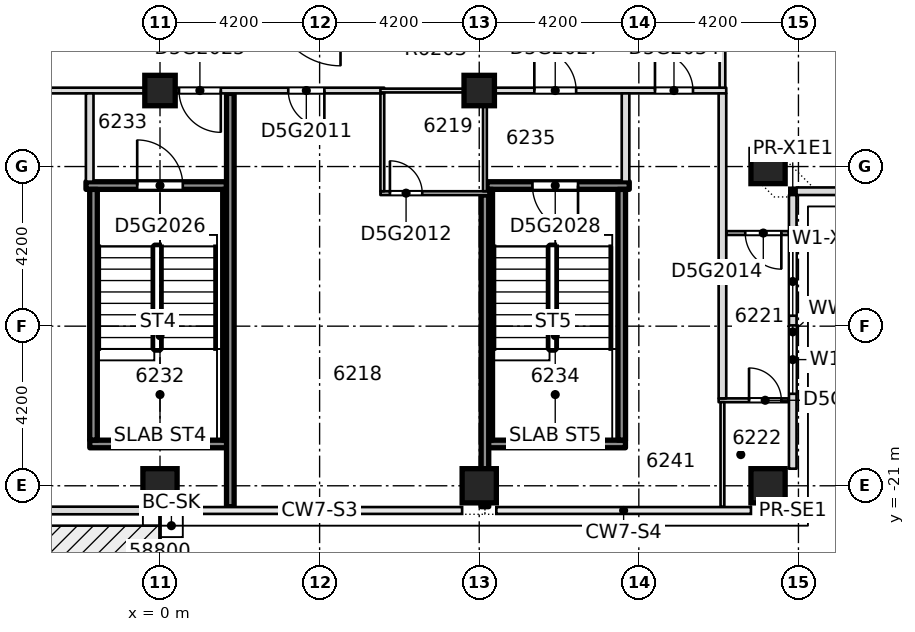
"""IFC4 building model, lengths in metres.
Left out: names, types, materials, properties, quantities, classifications, styles, units other than length and angle.
Written with IfcOpenShell. Run it as: python <this file> out.ifc"""

import sys

from ifc_helpers import new_model, si_unit, direction, frame, frame_2d, origin, origin_2d, place, context, subcontext, project, spatial, rectangle, extrude, element, fill, save


model = new_model("IFC4")
c1 = context("Model", 3, precision=1e-05, world=origin(), true_north=direction((0.0, 1.0)))
c2 = subcontext(c1, "Body", "Model", "MODEL_VIEW")
j1 = project(units=[si_unit("LENGTHUNIT", "METRE"), si_unit("PLANEANGLEUNIT", "RADIAN")], contexts=[c1])
p1 = place(None, origin())
s1 = spatial("IfcSite", under=j1, at=p1, CompositionType="ELEMENT")
p2 = place(p1, origin())
s2 = spatial("IfcBuilding", under=s1, at=p2, CompositionType="ELEMENT")
p3 = place(p2, frame((0.0, 0.0, 237.25)))
s3 = spatial("IfcBuildingStorey", under=s2, at=p3, CompositionType="ELEMENT", Elevation=237.25)
for number, where, z_axis, x_axis in (
    (1, (0.0, -21.0, -0.4), (0.0, 0.0, 1.0), (1.0, 0.0, 0.0)),
    (2, (8.4, -21.0, -0.4), (0.0, 0.0, 1.0), (1.0, 0.0, 0.0)),
    (3, (16.0, -21.0, -0.4), (0.0, 0.0, 1.0), (1.0, 0.0, 0.0)),
    (4, (16.0, -12.6, -0.4), (0.0, 0.0, 1.0), (1.0, 0.0, 0.0)),
):
    element("IfcColumn", number, at=place(p3, frame(where, z_axis=z_axis, x_axis=x_axis)), inside=s3, PredefinedType="COLUMN", context=c2, shape_type="SweptSolid", body=[
        extrude(rectangle(XDim=0.9, YDim=0.9, at=origin_2d()), origin(), (0.0, 0.0, 1.0), 3.45),
    ])
for number, where, z_axis, x_axis in (
    (5, (0.0, -10.6, -0.4), (0.0, 0.0, 1.0), (1.0, 0.0, 0.0)),
    (6, (8.4, -10.6, -0.4), (0.0, 0.0, 1.0), (1.0, 0.0, 0.0)),
):
    element("IfcColumn", number, at=place(p3, frame(where, z_axis=z_axis, x_axis=x_axis)), inside=s3, PredefinedType="COLUMN", context=c2, shape_type="SweptSolid", body=[
        extrude(rectangle(XDim=0.8, YDim=0.8, at=origin_2d()), origin(), (0.0, 0.0, 1.0), 3.45),
    ])
p4 = place(p3, frame((-1.848, -19.9, 0.0), z_axis=(0.0, 0.0, 1.0), x_axis=(1.0, 0.0, 0.0)))
e7 = element("IfcWall", 7, at=p4, inside=s3, PredefinedType="SOLIDWALL", context=c2, shape_type="SweptSolid", body=[
    extrude(rectangle(XDim=3.696, YDim=0.2, at=frame_2d((1.848, 0.0))), origin(), (0.0, 0.0, 1.0), 3.05),
])
p5 = place(p3, frame((8.552, -19.9, 0.0), z_axis=(0.0, 0.0, 1.0), x_axis=(1.0, 0.0, 0.0)))
e8 = element("IfcWall", 8, at=p5, inside=s3, PredefinedType="SOLIDWALL", context=c2, shape_type="SweptSolid", body=[
    extrude(rectangle(XDim=3.696, YDim=0.2, at=frame_2d((1.848, 0.0))), origin(), (0.0, 0.0, 1.0), 3.05),
])
p6 = place(p3, frame((14.7, -18.75, 0.0), z_axis=(0.0, 0.0, 1.0), x_axis=(1.0, 0.0, 0.0)))
e9 = element("IfcWall", 9, at=p6, inside=s3, PredefinedType="PARTITIONING", context=c2, shape_type="SweptSolid", body=[
    extrude(rectangle(XDim=1.85, YDim=0.1, at=frame_2d((0.925, 0.0))), origin(), (0.0, 0.0, 1.0), 3.05),
])
p7 = place(p6, frame((0.8, 0.0, 0.0)))
e10 = element("IfcOpeningElement", 10, at=p7, cuts=e9, PredefinedType="OPENING", context=c2, shape_type="SweptSolid", body=[
    extrude(rectangle(XDim=0.85, YDim=2.1, at=frame_2d((0.425, 1.05))), frame((0.0, 0.06, 0.0), z_axis=(0.0, -1.0, 0.0), x_axis=(1.0, 0.0, 0.0)), (0.0, 0.0, 1.0), 0.12),
])
p8 = place(p3, frame((14.9, -14.35, 0.0), z_axis=(0.0, 0.0, 1.0), x_axis=(1.0, 0.0, 0.0)))
e11 = element("IfcWall", 11, at=p8, inside=s3, PredefinedType="PARTITIONING", context=c2, shape_type="SweptSolid", body=[
    extrude(rectangle(XDim=1.65, YDim=0.1, at=frame_2d((0.825, 0.0))), origin(), (0.0, 0.0, 1.0), 3.05),
])
p9 = place(p8, frame((0.5, 0.0, 0.0)))
e12 = element("IfcOpeningElement", 12, at=p9, cuts=e11, PredefinedType="OPENING", context=c2, shape_type="SweptSolid", body=[
    extrude(rectangle(XDim=0.95, YDim=2.1, at=frame_2d((0.475, 1.05))), frame((0.0, 0.06, 0.0), z_axis=(0.0, -1.0, 0.0), x_axis=(1.0, 0.0, 0.0)), (0.0, 0.0, 1.0), 0.12),
])
p10 = place(p3, frame((5.8, -13.3, 0.0), z_axis=(0.0, 0.0, 1.0), x_axis=(1.0, 0.0, 0.0)))
e13 = element("IfcWall", 13, at=p10, inside=s3, PredefinedType="PARTITIONING", context=c2, shape_type="SweptSolid", body=[
    extrude(rectangle(XDim=2.85, YDim=0.1, at=frame_2d((1.425, 0.0))), origin(), (0.0, 0.0, 1.0), 3.05),
])
p11 = place(p10, frame((0.25, 0.0, 0.0)))
e14 = element("IfcOpeningElement", 14, at=p11, cuts=e13, PredefinedType="OPENING", context=c2, shape_type="SweptSolid", body=[
    extrude(rectangle(XDim=0.85, YDim=2.1, at=frame_2d((0.425, 1.05))), frame((0.0, 0.06, 0.0), z_axis=(0.0, -1.0, 0.0), x_axis=(1.0, 0.0, 0.0)), (0.0, 0.0, 1.0), 0.12),
])
p12 = place(p3, frame((-1.948, -13.1, 0.0), z_axis=(0.0, 0.0, 1.0), x_axis=(1.0, 0.0, 0.0)))
e15 = element("IfcWall", 15, at=p12, inside=s3, PredefinedType="SOLIDWALL", context=c2, shape_type="SweptSolid", body=[
    extrude(rectangle(XDim=3.696, YDim=0.2, at=frame_2d((1.848, 0.0))), origin(), (0.0, 0.0, 1.0), 3.05),
])
p13 = place(p12, frame((1.348, 0.0, 0.0)))
e16 = element("IfcOpeningElement", 16, at=p13, cuts=e15, PredefinedType="OPENING", context=c2, shape_type="SweptSolid", body=[
    extrude(rectangle(XDim=1.2, YDim=2.1, at=frame_2d((0.6, 1.05))), frame((0.0, 0.11, 0.0), z_axis=(0.0, -1.0, 0.0), x_axis=(1.0, 0.0, 0.0)), (0.0, 0.0, 1.0), 0.22),
])
p14 = place(p3, frame((8.602, -13.1, 0.0), z_axis=(0.0, 0.0, 1.0), x_axis=(1.0, 0.0, 0.0)))
e17 = element("IfcWall", 17, at=p14, inside=s3, PredefinedType="SOLIDWALL", context=c2, shape_type="SweptSolid", body=[
    extrude(rectangle(XDim=3.746, YDim=0.2, at=frame_2d((1.873, 0.0))), origin(), (0.0, 0.0, 1.0), 3.05),
])
p15 = place(p14, frame((1.198, 0.0, 0.0)))
e18 = element("IfcOpeningElement", 18, at=p15, cuts=e17, PredefinedType="OPENING", context=c2, shape_type="SweptSolid", body=[
    extrude(rectangle(XDim=1.2, YDim=2.1, at=frame_2d((0.6, 1.05))), frame((0.0, 0.11, 0.0), z_axis=(0.0, -1.0, 0.0), x_axis=(1.0, 0.0, 0.0)), (0.0, 0.0, 1.0), 0.22),
])
p16 = place(p3, frame((-14.9, -10.6, 0.0), z_axis=(0.0, 0.0, 1.0), x_axis=(1.0, 0.0, 0.0)))
e19 = element("IfcWall", 19, at=p16, inside=s3, PredefinedType="PARTITIONING", context=c2, shape_type="SweptSolid", body=[
    extrude(rectangle(XDim=20.8, YDim=0.15, at=frame_2d((10.4, 0.0))), origin(), (0.0, 0.0, 1.0), 3.05),
])
p17 = place(p16, frame((9.225, 0.0, 0.0)))
e20 = element("IfcOpeningElement", 20, at=p17, cuts=e19, PredefinedType="OPENING", context=c2, shape_type="SweptSolid", body=[
    extrude(rectangle(XDim=0.95, YDim=2.1, at=frame_2d((0.475, 1.05))), frame((0.0, 0.085, 0.0), z_axis=(0.0, -1.0, 0.0), x_axis=(1.0, 0.0, 0.0)), (0.0, 0.0, 1.0), 0.17),
])
p18 = place(p16, frame((18.275, 0.0, 0.0)))
e21 = element("IfcOpeningElement", 21, at=p18, cuts=e19, PredefinedType="OPENING", context=c2, shape_type="SweptSolid", body=[
    extrude(rectangle(XDim=0.95, YDim=2.1, at=frame_2d((0.475, 1.05))), frame((0.0, 0.085, 0.0), z_axis=(0.0, -1.0, 0.0), x_axis=(1.0, 0.0, 0.0)), (0.0, 0.0, 1.0), 0.17),
])
p19 = place(p16, frame((3.95, 0.0, 0.0)))
e22 = element("IfcOpeningElement", 22, at=p19, cuts=e19, PredefinedType="OPENING", context=c2, shape_type="SweptSolid", body=[
    extrude(rectangle(XDim=1.1, YDim=2.1, at=frame_2d((0.55, 1.05))), frame((0.0, 0.085, 0.0), z_axis=(0.0, -1.0, 0.0), x_axis=(1.0, 0.0, 0.0)), (0.0, 0.0, 1.0), 0.17),
])
p20 = place(p16, frame((15.4, 0.0, 0.0)))
e23 = element("IfcOpeningElement", 23, at=p20, cuts=e19, PredefinedType="OPENING", context=c2, shape_type="SweptSolid", body=[
    extrude(rectangle(XDim=1.1, YDim=2.1, at=frame_2d((0.55, 1.05))), frame((0.0, 0.085, 0.0), z_axis=(0.0, -1.0, 0.0), x_axis=(1.0, 0.0, 0.0)), (0.0, 0.0, 1.0), 0.17),
])
p21 = place(p16, frame((0.875, 0.0, 0.0)))
e24 = element("IfcOpeningElement", 24, at=p21, cuts=e19, PredefinedType="OPENING", context=c2, shape_type="SweptSolid", body=[
    extrude(rectangle(XDim=1.0, YDim=2.1, at=frame_2d((0.5, 1.05))), frame((0.0, 0.085, 0.0), z_axis=(0.0, -1.0, 0.0), x_axis=(1.0, 0.0, 0.0)), (0.0, 0.0, 1.0), 0.17),
])
p22 = place(p3, frame((5.8, -10.6, 0.0), z_axis=(0.0, 0.0, 1.0), x_axis=(1.0, 0.0, 0.0)))
e25 = element("IfcWall", 25, at=p22, inside=s3, PredefinedType="PARTITIONING", context=c2, shape_type="SweptSolid", body=[
    extrude(rectangle(XDim=2.8, YDim=0.1, at=frame_2d((1.4, 0.0))), origin(), (0.0, 0.0, 1.0), 3.05),
])
p23 = place(p3, frame((8.5, -10.6, 0.0), z_axis=(0.0, 0.0, 1.0), x_axis=(1.0, 0.0, 0.0)))
e26 = element("IfcWall", 26, at=p23, inside=s3, PredefinedType="PARTITIONING", context=c2, shape_type="SweptSolid", body=[
    extrude(rectangle(XDim=6.4, YDim=0.15, at=frame_2d((3.2, 0.0))), origin(), (0.0, 0.0, 1.0), 3.05),
])
p24 = place(p23, frame((1.35, 0.0, 0.0)))
e27 = element("IfcOpeningElement", 27, at=p24, cuts=e26, PredefinedType="OPENING", context=c2, shape_type="SweptSolid", body=[
    extrude(rectangle(XDim=1.1, YDim=2.1, at=frame_2d((0.55, 1.05))), frame((0.0, 0.085, 0.0), z_axis=(0.0, -1.0, 0.0), x_axis=(1.0, 0.0, 0.0)), (0.0, 0.0, 1.0), 0.17),
])
p25 = place(p23, frame((4.525, 0.0, 0.0)))
e28 = element("IfcOpeningElement", 28, at=p25, cuts=e26, PredefinedType="OPENING", context=c2, shape_type="SweptSolid", body=[
    extrude(rectangle(XDim=1.0, YDim=2.1, at=frame_2d((0.5, 1.05))), frame((0.0, 0.085, 0.0), z_axis=(0.0, -1.0, 0.0), x_axis=(1.0, 0.0, 0.0)), (0.0, 0.0, 1.0), 0.17),
])
p26 = place(p3, frame((-1.85, -12.998, 0.0), z_axis=(0.0, 0.0, 1.0), x_axis=(0.0, 1.0, 0.0)))
e29 = element("IfcWall", 29, at=p26, inside=s3, PredefinedType="PARTITIONING", context=c2, shape_type="SweptSolid", body=[
    extrude(rectangle(XDim=2.323, YDim=0.2, at=frame_2d((1.162, 0.0))), origin(), (0.0, 0.0, 1.0), 3.05),
])
for number, where, z_axis, x_axis in (
    (30, (-1.75, -19.798, 0.0), (0.0, 0.0, 1.0), (0.0, 1.0, 0.0)),
    (31, (1.75, -19.798, 0.0), (0.0, 0.0, 1.0), (0.0, 1.0, 0.0)),
):
    element("IfcWall", number, at=place(p3, frame(where, z_axis=z_axis, x_axis=x_axis)), inside=s3, PredefinedType="SOLIDWALL", context=c2, shape_type="SweptSolid", body=[
        extrude(rectangle(XDim=6.596, YDim=0.2, at=frame_2d((3.298, 0.0))), origin(), (0.0, 0.0, 1.0), 3.05),
    ])
for number, where, z_axis, x_axis in (
    (32, (5.85, -13.25, 0.0), (0.0, 0.0, 1.0), (0.0, 1.0, 0.0)),
    (33, (8.55, -13.25, 0.0), (0.0, 0.0, 1.0), (0.0, 1.0, 0.0)),
):
    element("IfcWall", number, at=place(p3, frame(where, z_axis=z_axis, x_axis=x_axis)), inside=s3, PredefinedType="PARTITIONING", context=c2, shape_type="SweptSolid", body=[
        extrude(rectangle(XDim=2.575, YDim=0.1, at=frame_2d((1.288, 0.0))), origin(), (0.0, 0.0, 1.0), 3.05),
    ])
for number, where, z_axis, x_axis in (
    (34, (8.65, -19.798, 0.0), (0.0, 0.0, 1.0), (0.0, 1.0, 0.0)),
    (35, (12.15, -19.798, 0.0), (0.0, 0.0, 1.0), (0.0, 1.0, 0.0)),
):
    element("IfcWall", number, at=place(p3, frame(where, z_axis=z_axis, x_axis=x_axis)), inside=s3, PredefinedType="SOLIDWALL", context=c2, shape_type="SweptSolid", body=[
        extrude(rectangle(XDim=6.596, YDim=0.2, at=frame_2d((3.298, 0.0))), origin(), (0.0, 0.0, 1.0), 3.05),
    ])
p27 = place(p3, frame((12.25, -12.998, 0.0), z_axis=(0.0, 0.0, 1.0), x_axis=(0.0, 1.0, 0.0)))
e36 = element("IfcWall", 36, at=p27, inside=s3, PredefinedType="PARTITIONING", context=c2, shape_type="SweptSolid", body=[
    extrude(rectangle(XDim=2.323, YDim=0.2, at=frame_2d((1.162, 0.0))), origin(), (0.0, 0.0, 1.0), 3.05),
])
p28 = place(p3, frame((14.8, -21.55, 0.0), z_axis=(0.0, 0.0, 1.0), x_axis=(0.0, 1.0, 0.0)))
e37 = element("IfcWall", 37, at=p28, inside=s3, PredefinedType="PARTITIONING", context=c2, shape_type="SweptSolid", body=[
    extrude(rectangle(XDim=2.75, YDim=0.1, at=frame_2d((1.375, 0.0))), origin(), (0.0, 0.0, 1.0), 3.05),
])
p29 = place(p3, frame((14.8, -18.7, 0.0), z_axis=(0.0, 0.0, 1.0), x_axis=(0.0, 1.0, 0.0)))
e38 = element("IfcWall", 38, at=p29, inside=s3, PredefinedType="PARTITIONING", context=c2, shape_type="SweptSolid", body=[
    extrude(rectangle(XDim=8.025, YDim=0.2, at=frame_2d((4.012, 0.0))), origin(), (0.0, 0.0, 1.0), 3.05),
])
p30 = place(p3, frame((14.8, -10.525, 0.0), z_axis=(0.0, 0.0, 1.0), x_axis=(0.0, 1.0, 0.0)))
e39 = element("IfcWall", 39, at=p30, inside=s3, PredefinedType="PARTITIONING", context=c2, shape_type="SweptSolid", body=[
    extrude(rectangle(XDim=3.05, YDim=0.15, at=frame_2d((1.525, 0.0))), origin(), (0.0, 0.0, 1.0), 3.05),
])
p31 = place(p3, frame((-7.95, -21.65, 0.0), z_axis=(0.0, 0.0, 1.0), x_axis=(1.0, 0.0, 0.0)))
e40 = element("IfcWall", 40, at=p31, inside=s3, PredefinedType="STANDARD", context=c2, shape_type="SweptSolid", body=[
    extrude(rectangle(XDim=7.5, YDim=0.2, at=frame_2d((3.75, 0.0))), origin(), (0.0, 0.0, 1.0), 3.05),
])
p32 = place(p31, frame((0.425, 0.0, 0.2)))
e41 = element("IfcOpeningElement", 41, at=p32, cuts=e40, PredefinedType="OPENING", context=c2, shape_type="SweptSolid", body=[
    extrude(rectangle(XDim=1.8, YDim=2.65, at=frame_2d((0.9, 1.325))), frame((0.0, 0.11, 0.0), z_axis=(0.0, -1.0, 0.0), x_axis=(1.0, 0.0, 0.0)), (0.0, 0.0, 1.0), 0.22),
])
p33 = place(p31, frame((2.325, 0.0, 0.0)))
e42 = element("IfcOpeningElement", 42, at=p33, cuts=e40, PredefinedType="OPENING", context=c2, shape_type="SweptSolid", body=[
    extrude(rectangle(XDim=1.0, YDim=2.4, at=frame_2d((0.5, 1.2))), frame((0.0, 0.11, 0.0), z_axis=(0.0, -1.0, 0.0), x_axis=(1.0, 0.0, 0.0)), (0.0, 0.0, 1.0), 0.22),
])
p34 = place(p3, frame((16.65, -20.55, 0.0), z_axis=(0.0, 0.0, 1.0), x_axis=(0.0, 1.0, 0.0)))
e43 = element("IfcWall", 43, at=p34, inside=s3, PredefinedType="STANDARD", context=c2, shape_type="SweptSolid", body=[
    extrude(rectangle(XDim=7.2, YDim=0.2, at=frame_2d((3.6, 0.0))), origin(), (0.0, 0.0, 1.0), 3.05),
])
p35 = place(p34, frame((1.97, 0.0, 0.2)))
e44 = element("IfcOpeningElement", 44, at=p35, cuts=e43, PredefinedType="OPENING", context=c2, shape_type="SweptSolid", body=[
    extrude(rectangle(XDim=1.8, YDim=2.65, at=frame_2d((0.9, 1.325))), frame((0.0, 0.11, 0.0), z_axis=(0.0, -1.0, 0.0), x_axis=(1.0, 0.0, 0.0)), (0.0, 0.0, 1.0), 0.22),
])
p36 = place(p34, frame((4.025, 0.0, 0.2)))
e45 = element("IfcOpeningElement", 45, at=p36, cuts=e43, PredefinedType="OPENING", context=c2, shape_type="SweptSolid", body=[
    extrude(rectangle(XDim=1.8, YDim=2.65, at=frame_2d((0.9, 1.325))), frame((0.0, 0.11, 0.0), z_axis=(0.0, -1.0, 0.0), x_axis=(1.0, 0.0, 0.0)), (0.0, 0.0, 1.0), 0.22),
])
p37 = place(p3, frame((16.75, -13.25, 0.0), z_axis=(0.0, 0.0, 1.0), x_axis=(1.0, 0.0, 0.0)))
e46 = element("IfcWall", 46, at=p37, inside=s3, PredefinedType="STANDARD", context=c2, shape_type="SweptSolid", body=[
    extrude(rectangle(XDim=8.0, YDim=0.2, at=frame_2d((4.0, 0.0))), origin(), (0.0, 0.0, 1.0), 3.05),
])
p38 = place(p3, frame((1.85, -21.55, 0.0), z_axis=(0.0, 0.0, 1.0), x_axis=(0.0, 1.0, 0.0)))
e47 = element("IfcWall", 47, at=p38, inside=s3, PredefinedType="SOLIDWALL", context=c2, shape_type="SweptSolid", body=[
    extrude(rectangle(XDim=10.875, YDim=0.2, at=frame_2d((5.438, 0.0))), origin(), (0.0, 0.0, 1.0), 3.05),
])
p39 = place(p3, frame((8.55, -21.55, 0.0), z_axis=(0.0, 0.0, 1.0), x_axis=(0.0, 1.0, 0.0)))
e48 = element("IfcWall", 48, at=p39, inside=s3, PredefinedType="SOLIDWALL", context=c2, shape_type="SweptSolid", body=[
    extrude(rectangle(XDim=8.2, YDim=0.2, at=frame_2d((4.1, 0.0))), origin(), (0.0, 0.0, 1.0), 3.05),
])
p40 = place(p18, origin())
e49 = element("IfcDoor", 49, at=p40, inside=s3, OperationType="SINGLE_SWING_LEFT", PredefinedType="DOOR", context=c2, shape_type="SweptSolid", body=[
    extrude(rectangle(XDim=0.95, YDim=2.1, at=frame_2d((0.475, 1.05))), frame((0.0, 0.025, 0.0), z_axis=(0.0, -1.0, 0.0), x_axis=(1.0, 0.0, 0.0)), (0.0, 0.0, 1.0), 0.05),
])
fill(e21, e49)
p41 = place(p11, origin())
e50 = element("IfcDoor", 50, at=p41, inside=s3, OperationType="SINGLE_SWING_LEFT", PredefinedType="DOOR", context=c2, shape_type="SweptSolid", body=[
    extrude(rectangle(XDim=0.85, YDim=2.1, at=frame_2d((0.425, 1.05))), frame((0.0, 0.025, 0.0), z_axis=(0.0, -1.0, 0.0), x_axis=(1.0, 0.0, 0.0)), (0.0, 0.0, 1.0), 0.05),
])
fill(e14, e50)
p42 = place(p9, origin())
e51 = element("IfcDoor", 51, at=p42, inside=s3, OperationType="SINGLE_SWING_RIGHT", PredefinedType="DOOR", context=c2, shape_type="SweptSolid", body=[
    extrude(rectangle(XDim=0.95, YDim=2.1, at=frame_2d((0.475, 1.05))), frame((0.0, 0.025, 0.0), z_axis=(0.0, -1.0, 0.0), x_axis=(1.0, 0.0, 0.0)), (0.0, 0.0, 1.0), 0.05),
])
fill(e12, e51)
p43 = place(p7, origin())
e52 = element("IfcDoor", 52, at=p43, inside=s3, OperationType="SINGLE_SWING_RIGHT", PredefinedType="DOOR", context=c2, shape_type="SweptSolid", body=[
    extrude(rectangle(XDim=0.85, YDim=2.1, at=frame_2d((0.425, 1.05))), frame((0.0, 0.025, 0.0), z_axis=(0.0, -1.0, 0.0), x_axis=(1.0, 0.0, 0.0)), (0.0, 0.0, 1.0), 0.05),
])
fill(e10, e52)
p44 = place(p20, origin())
e53 = element("IfcDoor", 53, at=p44, inside=s3, OperationType="SINGLE_SWING_LEFT", PredefinedType="DOOR", context=c2, shape_type="SweptSolid", body=[
    extrude(rectangle(XDim=1.1, YDim=2.1, at=frame_2d((0.55, 1.05))), frame((0.0, 0.025, 0.0), z_axis=(0.0, -1.0, 0.0), x_axis=(1.0, 0.0, 0.0)), (0.0, 0.0, 1.0), 0.05),
])
fill(e23, e53)
p45 = place(p13, origin())
e54 = element("IfcDoor", 54, at=p45, inside=s3, OperationType="SINGLE_SWING_RIGHT", PredefinedType="DOOR", context=c2, shape_type="SweptSolid", body=[
    extrude(rectangle(XDim=1.2, YDim=2.1, at=frame_2d((0.6, 1.05))), frame((0.0, 0.025, 0.0), z_axis=(0.0, -1.0, 0.0), x_axis=(1.0, 0.0, 0.0)), (0.0, 0.0, 1.0), 0.05),
])
fill(e16, e54)
p46 = place(p24, origin())
e55 = element("IfcDoor", 55, at=p46, inside=s3, OperationType="SINGLE_SWING_RIGHT", PredefinedType="DOOR", context=c2, shape_type="SweptSolid", body=[
    extrude(rectangle(XDim=1.1, YDim=2.1, at=frame_2d((0.55, 1.05))), frame((0.0, 0.025, 0.0), z_axis=(0.0, -1.0, 0.0), x_axis=(1.0, 0.0, 0.0)), (0.0, 0.0, 1.0), 0.05),
])
fill(e27, e55)
p47 = place(p15, origin())
e56 = element("IfcDoor", 56, at=p47, inside=s3, OperationType="SINGLE_SWING_RIGHT", PredefinedType="DOOR", context=c2, shape_type="SweptSolid", body=[
    extrude(rectangle(XDim=1.2, YDim=2.1, at=frame_2d((0.6, 1.05))), frame((0.0, 0.025, 0.0), z_axis=(0.0, -1.0, 0.0), x_axis=(1.0, 0.0, 0.0)), (0.0, 0.0, 1.0), 0.05),
])
fill(e18, e56)
p48 = place(p25, origin())
e57 = element("IfcDoor", 57, at=p48, inside=s3, OperationType="SINGLE_SWING_RIGHT", PredefinedType="DOOR", context=c2, shape_type="SweptSolid", body=[
    extrude(rectangle(XDim=1.0, YDim=2.1, at=frame_2d((0.5, 1.05))), frame((0.0, 0.025, 0.0), z_axis=(0.0, -1.0, 0.0), x_axis=(1.0, 0.0, 0.0)), (0.0, 0.0, 1.0), 0.05),
])
fill(e28, e57)
p49 = place(p35, origin())
e58 = element("IfcWindow", 58, at=p49, inside=s3, PartitioningType="SINGLE_PANEL", PredefinedType="WINDOW", context=c2, shape_type="SweptSolid", body=[
    extrude(rectangle(XDim=1.8, YDim=2.65, at=frame_2d((0.9, 1.325))), frame((0.0, 0.03, 0.0), z_axis=(0.0, -1.0, 0.0), x_axis=(1.0, 0.0, 0.0)), (0.0, 0.0, 1.0), 0.06),
])
fill(e44, e58)
p50 = place(p36, origin())
e59 = element("IfcWindow", 59, at=p50, inside=s3, PartitioningType="SINGLE_PANEL", PredefinedType="WINDOW", context=c2, shape_type="SweptSolid", body=[
    extrude(rectangle(XDim=1.8, YDim=2.65, at=frame_2d((0.9, 1.325))), frame((0.0, 0.03, 0.0), z_axis=(0.0, -1.0, 0.0), x_axis=(1.0, 0.0, 0.0)), (0.0, 0.0, 1.0), 0.06),
])
fill(e45, e59)
save(model, sys.argv[1])
